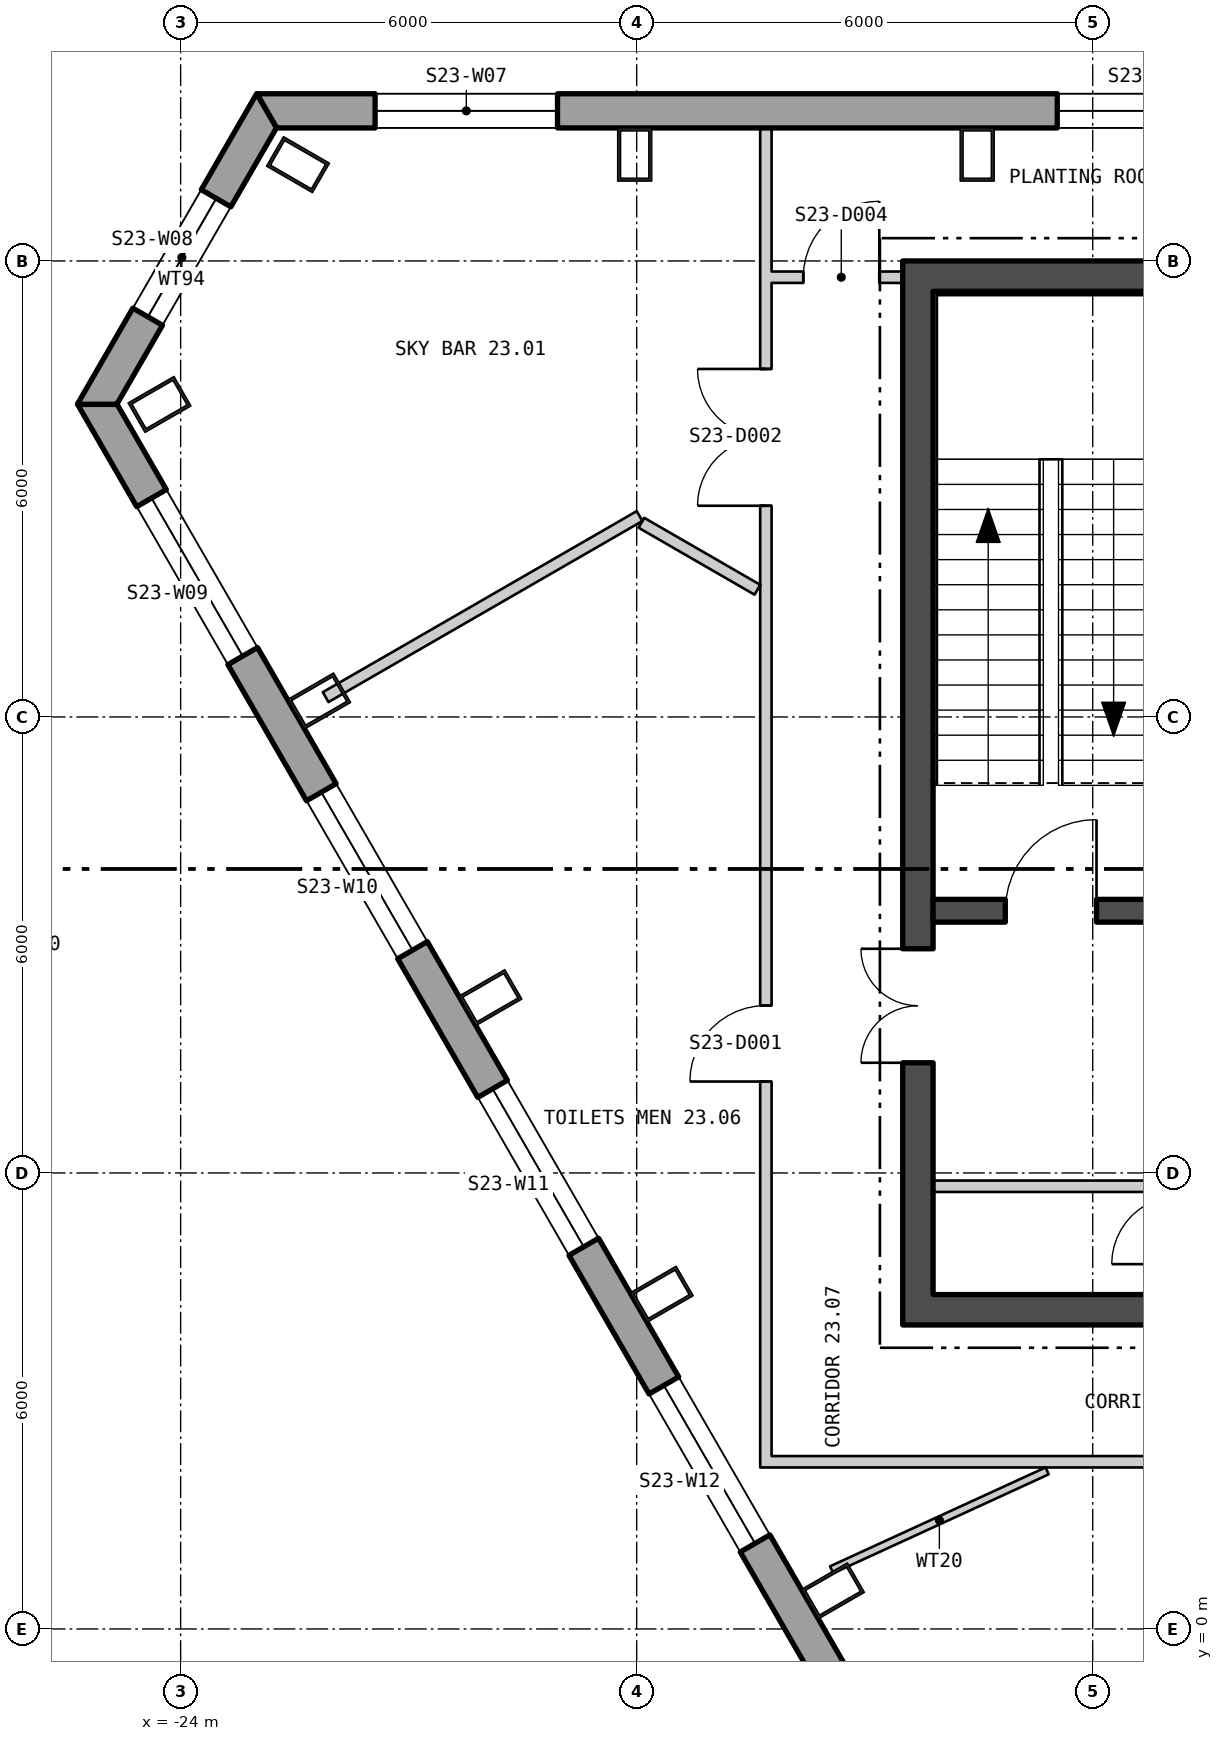
"""IFC4 building model, lengths in metres.
Left out: names, types, materials, properties, quantities, classifications, styles, units other than length and angle.
Written with IfcOpenShell. Run it as: python <this file> out.ifc"""

import sys

from ifc_helpers import new_model, si_unit, direction, frame, frame_2d, origin, origin_2d, place, context, subcontext, project, spatial, polyline, rectangle, hollow_rectangle, outline, extrude, element, fill, save


model = new_model("IFC4")
c1 = context("Model", 3, precision=1e-05, world=origin(), true_north=direction((0.0, 1.0)))
c2 = subcontext(c1, "Body", "Model", "MODEL_VIEW")
j1 = project(units=[si_unit("LENGTHUNIT", "METRE"), si_unit("PLANEANGLEUNIT", "RADIAN")], contexts=[c1])
p1 = place(None, origin())
s1 = spatial("IfcSite", under=j1, at=p1, CompositionType="ELEMENT")
p2 = place(p1, origin())
s2 = spatial("IfcBuilding", under=s1, at=p2, CompositionType="ELEMENT")
p3 = place(p2, frame((0.0, 0.0, 304.2)))
s3 = spatial("IfcBuildingStorey", under=s2, at=p3, CompositionType="ELEMENT", Elevation=304.2)
for number, where, z_axis, x_axis in (
    (1, (-13.52, 19.4, 0.0), (0.0, 0.0, 1.0), (-1.0, 0.0, 0.0)),
    (2, (-18.026, 19.4, 0.0), (0.0, 0.0, 1.0), (-1.0, 0.0, 0.0)),
    (3, (-22.456, 19.267, 0.0), (0.0, 0.0, 1.0), (-0.5, -0.866, 0.0)),
    (4, (-24.278, 16.112, 0.0), (0.0, 0.0, 1.0), (0.5, -0.866, 0.0)),
    (5, (-22.178, 12.21, 0.0), (0.0, 0.0, 1.0), (0.5, -0.866, 0.0)),
    (6, (-19.925, 8.307, 0.0), (0.0, 0.0, 1.0), (0.5, -0.866, 0.0)),
    (7, (-17.671, 4.404, 0.0), (0.0, 0.0, 1.0), (0.5, -0.866, 0.0)),
    (8, (-15.418, 0.501, 0.0), (0.0, 0.0, 1.0), (0.5, -0.866, 0.0)),
):
    element("IfcColumn", number, at=place(p3, frame(where, z_axis=z_axis, x_axis=x_axis)), inside=s3, PredefinedType="COLUMN", context=c2, shape_type="SweptSolid", body=[
        extrude(hollow_rectangle(XDim=0.45, YDim=0.7, WallThickness=0.04, at=origin_2d()), origin(), (0.0, 0.0, 1.0), 4.2),
    ])
p4 = place(p3, frame((22.865, 19.975, -0.4), z_axis=(0.0, 0.0, 1.0), x_axis=(-1.0, 0.0, 0.0)))
e9 = element("IfcWall", 9, at=p4, inside=s3, PredefinedType="SOLIDWALL", context=c2, shape_type="SweptSolid", body=[
    extrude(outline(polyline([(-0.13, -0.225), (45.86, -0.225), (45.6, 0.225), (0.13, 0.225), (-0.13, -0.225)])), origin(), (0.0, 0.0, 1.0), 4.2),
])
p5 = place(p4, frame((1.424, 0.0, 1.3)))
e10 = element("IfcOpeningElement", 10, at=p5, cuts=e9, PredefinedType="OPENING", context=c2, shape_type="SweptSolid", body=[
    extrude(rectangle(XDim=2.4, YDim=2.3, at=frame_2d((1.2, 1.15))), frame((0.0, 0.235, 0.0), z_axis=(0.0, -1.0, 0.0), x_axis=(1.0, 0.0, 0.0)), (0.0, 0.0, 1.0), 0.47),
])
p6 = place(p4, frame((14.905, 0.0, 1.3)))
e11 = element("IfcOpeningElement", 11, at=p6, cuts=e9, PredefinedType="OPENING", context=c2, shape_type="SweptSolid", body=[
    extrude(rectangle(XDim=2.4, YDim=2.3, at=frame_2d((1.2, 1.15))), frame((0.0, 0.235, 0.0), z_axis=(0.0, -1.0, 0.0), x_axis=(1.0, 0.0, 0.0)), (0.0, 0.0, 1.0), 0.47),
])
p7 = place(p4, frame((19.412, 0.0, 1.3)))
e12 = element("IfcOpeningElement", 12, at=p7, cuts=e9, PredefinedType="OPENING", context=c2, shape_type="SweptSolid", body=[
    extrude(rectangle(XDim=2.4, YDim=2.3, at=frame_2d((1.2, 1.15))), frame((0.0, 0.235, 0.0), z_axis=(0.0, -1.0, 0.0), x_axis=(1.0, 0.0, 0.0)), (0.0, 0.0, 1.0), 0.47),
])
p8 = place(p4, frame((23.918, 0.0, 1.3)))
e13 = element("IfcOpeningElement", 13, at=p8, cuts=e9, PredefinedType="OPENING", context=c2, shape_type="SweptSolid", body=[
    extrude(rectangle(XDim=2.4, YDim=2.3, at=frame_2d((1.2, 1.15))), frame((0.0, 0.235, 0.0), z_axis=(0.0, -1.0, 0.0), x_axis=(1.0, 0.0, 0.0)), (0.0, 0.0, 1.0), 0.47),
])
p9 = place(p4, frame((28.425, 0.0, 1.3)))
e14 = element("IfcOpeningElement", 14, at=p9, cuts=e9, PredefinedType="OPENING", context=c2, shape_type="SweptSolid", body=[
    extrude(rectangle(XDim=2.4, YDim=2.3, at=frame_2d((1.2, 1.15))), frame((0.0, 0.235, 0.0), z_axis=(0.0, -1.0, 0.0), x_axis=(1.0, 0.0, 0.0)), (0.0, 0.0, 1.0), 0.47),
])
p10 = place(p4, frame((32.932, 0.0, 1.3)))
e15 = element("IfcOpeningElement", 15, at=p10, cuts=e9, PredefinedType="OPENING", context=c2, shape_type="SweptSolid", body=[
    extrude(rectangle(XDim=2.4, YDim=2.3, at=frame_2d((1.2, 1.15))), frame((0.0, 0.235, 0.0), z_axis=(0.0, -1.0, 0.0), x_axis=(1.0, 0.0, 0.0)), (0.0, 0.0, 1.0), 0.47),
])
p11 = place(p4, frame((41.907, 0.0, 1.3)))
e16 = element("IfcOpeningElement", 16, at=p11, cuts=e9, PredefinedType="OPENING", context=c2, shape_type="SweptSolid", body=[
    extrude(rectangle(XDim=2.4, YDim=2.3, at=frame_2d((1.2, 1.15))), frame((0.0, 0.235, 0.0), z_axis=(0.0, -1.0, 0.0), x_axis=(1.0, 0.0, 0.0)), (0.0, 0.0, 1.0), 0.47),
])
p12 = place(p3, frame((-22.869, 19.977, -0.4), z_axis=(0.0, 0.0, 1.0), x_axis=(-0.499994806646, -0.866028402148, 0.0)))
e17 = element("IfcWall", 17, at=p12, inside=s3, PredefinedType="SOLIDWALL", context=c2, shape_type="SweptSolid", body=[
    extrude(outline(polyline([(-0.13, -0.225), (4.59, -0.225), (4.33, 0.225), (0.13, 0.225), (-0.13, -0.225)])), origin(), (0.0, 0.0, 1.0), 4.2),
])
p13 = place(p12, frame((1.33, 0.0, 1.3)))
e18 = element("IfcOpeningElement", 18, at=p13, cuts=e17, PredefinedType="OPENING", context=c2, shape_type="SweptSolid", body=[
    extrude(rectangle(XDim=1.8, YDim=2.3, at=frame_2d((0.9, 1.15))), frame((0.0, 0.235, 0.0), z_axis=(0.0, -1.0, 0.0), x_axis=(1.0, 0.0, 0.0)), (0.0, 0.0, 1.0), 0.47),
])
p14 = place(p3, frame((-25.095, 16.112, -0.18), z_axis=(0.0, 0.0, 1.0), x_axis=(0.500000141277, -0.866025322218, 0.0)))
e19 = element("IfcWall", 19, at=p14, inside=s3, PredefinedType="SOLIDWALL", context=c2, shape_type="SweptSolid", body=[
    extrude(outline(polyline([(-0.13, -0.225), (45.86, -0.225), (45.6, 0.225), (0.13, 0.225), (-0.13, -0.225)])), origin(), (0.0, 0.0, 1.0), 3.98),
])
p15 = place(p14, frame((1.424, 0.0, 1.08)))
e20 = element("IfcOpeningElement", 20, at=p15, cuts=e19, PredefinedType="OPENING", context=c2, shape_type="SweptSolid", body=[
    extrude(rectangle(XDim=2.4, YDim=2.3, at=frame_2d((1.2, 1.15))), frame((0.0, 0.235, 0.0), z_axis=(0.0, -1.0, 0.0), x_axis=(1.0, 0.0, 0.0)), (0.0, 0.0, 1.0), 0.47),
])
p16 = place(p14, frame((5.892, 0.0, 1.08)))
e21 = element("IfcOpeningElement", 21, at=p16, cuts=e19, PredefinedType="OPENING", context=c2, shape_type="SweptSolid", body=[
    extrude(rectangle(XDim=2.4, YDim=2.3, at=frame_2d((1.2, 1.15))), frame((0.0, 0.235, 0.0), z_axis=(0.0, -1.0, 0.0), x_axis=(1.0, 0.0, 0.0)), (0.0, 0.0, 1.0), 0.47),
])
p17 = place(p14, frame((10.399, 0.0, 1.08)))
e22 = element("IfcOpeningElement", 22, at=p17, cuts=e19, PredefinedType="OPENING", context=c2, shape_type="SweptSolid", body=[
    extrude(rectangle(XDim=2.4, YDim=2.3, at=frame_2d((1.2, 1.15))), frame((0.0, 0.235, 0.0), z_axis=(0.0, -1.0, 0.0), x_axis=(1.0, 0.0, 0.0)), (0.0, 0.0, 1.0), 0.47),
])
p18 = place(p14, frame((14.905, 0.0, 1.08)))
e23 = element("IfcOpeningElement", 23, at=p18, cuts=e19, PredefinedType="OPENING", context=c2, shape_type="SweptSolid", body=[
    extrude(rectangle(XDim=2.4, YDim=2.3, at=frame_2d((1.2, 1.15))), frame((0.0, 0.235, 0.0), z_axis=(0.0, -1.0, 0.0), x_axis=(1.0, 0.0, 0.0)), (0.0, 0.0, 1.0), 0.47),
])
p19 = place(p14, frame((19.412, 0.0, 1.08)))
e24 = element("IfcOpeningElement", 24, at=p19, cuts=e19, PredefinedType="OPENING", context=c2, shape_type="SweptSolid", body=[
    extrude(rectangle(XDim=2.4, YDim=2.3, at=frame_2d((1.2, 1.15))), frame((0.0, 0.235, 0.0), z_axis=(0.0, -1.0, 0.0), x_axis=(1.0, 0.0, 0.0)), (0.0, 0.0, 1.0), 0.47),
])
p20 = place(p14, frame((28.425, 0.0, 1.08)))
e25 = element("IfcOpeningElement", 25, at=p20, cuts=e19, PredefinedType="OPENING", context=c2, shape_type="SweptSolid", body=[
    extrude(rectangle(XDim=2.4, YDim=2.3, at=frame_2d((1.2, 1.15))), frame((0.0, 0.235, 0.0), z_axis=(0.0, -1.0, 0.0), x_axis=(1.0, 0.0, 0.0)), (0.0, 0.0, 1.0), 0.47),
])
p21 = place(p14, frame((32.932, 0.0, 1.08)))
e26 = element("IfcOpeningElement", 26, at=p21, cuts=e19, PredefinedType="OPENING", context=c2, shape_type="SweptSolid", body=[
    extrude(rectangle(XDim=2.4, YDim=2.3, at=frame_2d((1.2, 1.15))), frame((0.0, 0.235, 0.0), z_axis=(0.0, -1.0, 0.0), x_axis=(1.0, 0.0, 0.0)), (0.0, 0.0, 1.0), 0.47),
])
p22 = place(p14, frame((37.438, 0.0, 1.08)))
e27 = element("IfcOpeningElement", 27, at=p22, cuts=e19, PredefinedType="OPENING", context=c2, shape_type="SweptSolid", body=[
    extrude(rectangle(XDim=2.4, YDim=2.3, at=frame_2d((1.2, 1.15))), frame((0.0, 0.235, 0.0), z_axis=(0.0, -1.0, 0.0), x_axis=(1.0, 0.0, 0.0)), (0.0, 0.0, 1.0), 0.47),
])
p23 = place(p14, frame((41.907, 0.0, 1.08)))
e28 = element("IfcOpeningElement", 28, at=p23, cuts=e19, PredefinedType="OPENING", context=c2, shape_type="SweptSolid", body=[
    extrude(rectangle(XDim=2.4, YDim=2.3, at=frame_2d((1.2, 1.15))), frame((0.0, 0.235, 0.0), z_axis=(0.0, -1.0, 0.0), x_axis=(1.0, 0.0, 0.0)), (0.0, 0.0, 1.0), 0.47),
])
p24 = place(p3, frame((-14.5, 4.2, 0.0), z_axis=(0.0, 0.0, 1.0), x_axis=(1.0, 0.0, 0.0)))
e29 = element("IfcWall", 29, at=p24, inside=s3, PredefinedType="SHEAR", context=c2, shape_type="SweptSolid", body=[
    extrude(rectangle(XDim=29.0, YDim=0.4, at=frame_2d((14.5, 0.0))), origin(), (0.0, 0.0, 1.0), 4.0),
])
p25 = place(p24, frame((9.0, 0.0, 0.0)))
e30 = element("IfcOpeningElement", 30, at=p25, cuts=e29, PredefinedType="OPENING", context=c2, shape_type="SweptSolid", body=[
    extrude(rectangle(XDim=1.8, YDim=2.4, at=frame_2d((0.9, 1.2))), frame((0.0, 0.21, 0.0), z_axis=(0.0, -1.0, 0.0), x_axis=(1.0, 0.0, 0.0)), (0.0, 0.0, 1.0), 0.42),
])
p26 = place(p24, frame((19.0, 0.0, 0.0)))
e31 = element("IfcOpeningElement", 31, at=p26, cuts=e29, PredefinedType="OPENING", context=c2, shape_type="SweptSolid", body=[
    extrude(rectangle(XDim=1.8, YDim=2.4, at=frame_2d((0.9, 1.2))), frame((0.0, 0.21, 0.0), z_axis=(0.0, -1.0, 0.0), x_axis=(1.0, 0.0, 0.0)), (0.0, 0.0, 1.0), 0.42),
])
p27 = place(p3, frame((-14.5, 17.8, 0.0), z_axis=(0.0, 0.0, 1.0), x_axis=(1.0, 0.0, 0.0)))
e32 = element("IfcWall", 32, at=p27, inside=s3, PredefinedType="SHEAR", context=c2, shape_type="SweptSolid", body=[
    extrude(rectangle(XDim=29.0, YDim=0.4, at=frame_2d((14.5, 0.0))), origin(), (0.0, 0.0, 1.0), 4.0),
])
p28 = place(p3, frame((-14.3, 4.4, 0.0), z_axis=(0.0, 0.0, 1.0), x_axis=(0.0, 1.0, 0.0)))
e33 = element("IfcWall", 33, at=p28, inside=s3, PredefinedType="SHEAR", context=c2, shape_type="SweptSolid", body=[
    extrude(rectangle(XDim=13.2, YDim=0.4, at=frame_2d((6.6, 0.0))), origin(), (0.0, 0.0, 1.0), 4.0),
])
p29 = place(p28, frame((3.05, 0.0, 0.0)))
e34 = element("IfcOpeningElement", 34, at=p29, cuts=e33, PredefinedType="OPENING", context=c2, shape_type="SweptSolid", body=[
    extrude(rectangle(XDim=1.5, YDim=2.1, at=frame_2d((0.75, 1.05))), frame((0.0, 0.21, 0.0), z_axis=(0.0, -1.0, 0.0), x_axis=(1.0, 0.0, 0.0)), (0.0, 0.0, 1.0), 0.42),
])
p30 = place(p3, frame((-14.1, 9.45, 0.0), z_axis=(0.0, 0.0, 1.0), x_axis=(1.0, 0.0, 0.0)))
e35 = element("IfcWall", 35, at=p30, inside=s3, PredefinedType="SHEAR", context=c2, shape_type="SweptSolid", body=[
    extrude(rectangle(XDim=3.1, YDim=0.3, at=frame_2d((1.55, 0.0))), origin(), (0.0, 0.0, 1.0), 4.0),
])
p31 = place(p30, frame((0.95, 0.0, 0.0)))
e36 = element("IfcOpeningElement", 36, at=p31, cuts=e35, PredefinedType="OPENING", context=c2, shape_type="SweptSolid", body=[
    extrude(rectangle(XDim=1.2, YDim=2.1, at=frame_2d((0.6, 1.05))), frame((0.0, 0.16, 0.0), z_axis=(0.0, -1.0, 0.0), x_axis=(1.0, 0.0, 0.0)), (0.0, 0.0, 1.0), 0.32),
])
p32 = place(p3, frame((-14.1, 5.825, 0.0), z_axis=(0.0, 0.0, 1.0), x_axis=(1.0, 0.0, 0.0)))
e37 = element("IfcWall", 37, at=p32, inside=s3, PredefinedType="PARTITIONING", context=c2, shape_type="SweptSolid", body=[
    extrude(rectangle(XDim=3.1, YDim=0.15, at=frame_2d((1.55, 0.0))), origin(), (0.0, 0.0, 1.0), 4.0),
])
p33 = place(p3, frame((-22.092, 12.261, 0.0), z_axis=(0.0, 0.0, 1.0), x_axis=(0.866248432975, 0.499613502989, 0.0)))
e38 = element("IfcWall", 38, at=p33, inside=s3, PredefinedType="PARTITIONING", context=c2, shape_type="SweptSolid", body=[
    extrude(rectangle(XDim=4.768, YDim=0.15, at=frame_2d((2.384, 0.0))), origin(), (0.0, 0.0, 1.0), 4.0),
])
p34 = place(p3, frame((-17.938, 14.555, 0.0), z_axis=(0.0, 0.0, 1.0), x_axis=(0.866034375916, -0.49998445949, 0.0)))
e39 = element("IfcWall", 39, at=p34, inside=s3, PredefinedType="PARTITIONING", context=c2, shape_type="SweptSolid", body=[
    extrude(rectangle(XDim=1.762, YDim=0.15, at=frame_2d((0.881, 0.0))), origin(), (0.0, 0.0, 1.0), 4.0),
])
p35 = place(p3, frame((-16.3, 2.125, 0.0), z_axis=(0.0, 0.0, 1.0), x_axis=(0.0, 1.0, 0.0)))
e40 = element("IfcWall", 40, at=p35, inside=s3, PredefinedType="PARTITIONING", context=c2, shape_type="SweptSolid", body=[
    extrude(rectangle(XDim=17.623, YDim=0.15, at=frame_2d((8.812, 0.0))), origin(), (0.0, 0.0, 1.0), 4.0),
])
p36 = place(p35, frame((5.078, 0.0, 0.0)))
e41 = element("IfcOpeningElement", 41, at=p36, cuts=e40, PredefinedType="OPENING", context=c2, shape_type="SweptSolid", body=[
    extrude(rectangle(XDim=1.0, YDim=2.1, at=frame_2d((0.5, 1.05))), frame((0.0, 0.085, 0.0), z_axis=(0.0, -1.0, 0.0), x_axis=(1.0, 0.0, 0.0)), (0.0, 0.0, 1.0), 0.17),
])
p37 = place(p35, frame((12.654, 0.0, 0.0)))
e42 = element("IfcOpeningElement", 42, at=p37, cuts=e40, PredefinedType="OPENING", context=c2, shape_type="SweptSolid", body=[
    extrude(rectangle(XDim=1.8, YDim=2.1, at=frame_2d((0.9, 1.05))), frame((0.0, 0.085, 0.0), z_axis=(0.0, -1.0, 0.0), x_axis=(1.0, 0.0, 0.0)), (0.0, 0.0, 1.0), 0.17),
])
p38 = place(p3, frame((-16.225, 2.2, 0.0), z_axis=(0.0, 0.0, 1.0), x_axis=(1.0, 0.0, 0.0)))
e43 = element("IfcWall", 43, at=p38, inside=s3, PredefinedType="PARTITIONING", context=c2, shape_type="SweptSolid", body=[
    extrude(rectangle(XDim=8.645, YDim=0.15, at=frame_2d((4.322, 0.0))), origin(), (0.0, 0.0, 1.0), 4.0),
])
p39 = place(p38, frame((5.714, 0.0, 0.0)))
e44 = element("IfcOpeningElement", 44, at=p39, cuts=e43, PredefinedType="OPENING", context=c2, shape_type="SweptSolid", body=[
    extrude(rectangle(XDim=1.0, YDim=2.1, at=frame_2d((0.5, 1.05))), frame((0.0, 0.085, 0.0), z_axis=(0.0, -1.0, 0.0), x_axis=(1.0, 0.0, 0.0)), (0.0, 0.0, 1.0), 0.17),
])
p40 = place(p3, frame((-16.225, 17.786, 0.0), z_axis=(0.0, 0.0, 1.0), x_axis=(1.0, 0.0, 0.0)))
e45 = element("IfcWall", 45, at=p40, inside=s3, PredefinedType="PARTITIONING", context=c2, shape_type="SweptSolid", body=[
    extrude(rectangle(XDim=1.725, YDim=0.15, at=frame_2d((0.863, 0.0))), origin(), (0.0, 0.0, 1.0), 4.0),
])
p41 = place(p40, frame((0.417, 0.0, 0.0)))
e46 = element("IfcOpeningElement", 46, at=p41, cuts=e45, PredefinedType="OPENING", context=c2, shape_type="SweptSolid", body=[
    extrude(rectangle(XDim=1.0, YDim=2.1, at=frame_2d((0.5, 1.05))), frame((0.0, 0.085, 0.0), z_axis=(0.0, -1.0, 0.0), x_axis=(1.0, 0.0, 0.0)), (0.0, 0.0, 1.0), 0.17),
])
p42 = place(p3, frame((-15.435, 0.779, 0.0), z_axis=(0.0, 0.0, 1.0), x_axis=(0.908867400556, 0.417085180996, 0.0)))
e47 = element("IfcWall", 47, at=p42, inside=s3, PredefinedType="PARTITIONING", context=c2, shape_type="SweptSolid", body=[
    extrude(rectangle(XDim=3.119, YDim=0.1, at=frame_2d((1.56, 0.0))), origin(), (0.0, 0.0, 1.0), 4.0),
])
p43 = place(p10, origin())
e48 = element("IfcWindow", 48, at=p43, inside=s3, PartitioningType="SINGLE_PANEL", PredefinedType="WINDOW", context=c2, shape_type="SweptSolid", body=[
    extrude(rectangle(XDim=2.4, YDim=2.3, at=frame_2d((1.2, 1.15))), frame((0.0, 0.105, 0.0), z_axis=(0.0, -1.0, 0.0), x_axis=(1.0, 0.0, 0.0)), (0.0, 0.0, 1.0), 0.06),
])
fill(e15, e48)
p44 = place(p11, origin())
e49 = element("IfcWindow", 49, at=p44, inside=s3, PartitioningType="SINGLE_PANEL", PredefinedType="WINDOW", context=c2, shape_type="SweptSolid", body=[
    extrude(rectangle(XDim=2.4, YDim=2.3, at=frame_2d((1.2, 1.15))), frame((0.0, 0.105, 0.0), z_axis=(0.0, -1.0, 0.0), x_axis=(1.0, 0.0, 0.0)), (0.0, 0.0, 1.0), 0.06),
])
fill(e16, e49)
p45 = place(p13, origin())
e50 = element("IfcWindow", 50, at=p45, inside=s3, PartitioningType="SINGLE_PANEL", PredefinedType="WINDOW", context=c2, shape_type="SweptSolid", body=[
    extrude(rectangle(XDim=1.8, YDim=2.3, at=frame_2d((0.9, 1.15))), frame((0.0, 0.105, 0.0), z_axis=(0.0, -1.0, 0.0), x_axis=(1.0, 0.0, 0.0)), (0.0, 0.0, 1.0), 0.06),
])
fill(e18, e50)
p46 = place(p15, origin())
e51 = element("IfcWindow", 51, at=p46, inside=s3, PartitioningType="SINGLE_PANEL", PredefinedType="WINDOW", context=c2, shape_type="SweptSolid", body=[
    extrude(rectangle(XDim=2.4, YDim=2.3, at=frame_2d((1.2, 1.15))), frame((0.0, 0.105, 0.0), z_axis=(0.0, -1.0, 0.0), x_axis=(1.0, 0.0, 0.0)), (0.0, 0.0, 1.0), 0.06),
])
fill(e20, e51)
p47 = place(p16, origin())
e52 = element("IfcWindow", 52, at=p47, inside=s3, PartitioningType="SINGLE_PANEL", PredefinedType="WINDOW", context=c2, shape_type="SweptSolid", body=[
    extrude(rectangle(XDim=2.4, YDim=2.3, at=frame_2d((1.2, 1.15))), frame((0.0, 0.105, 0.0), z_axis=(0.0, -1.0, 0.0), x_axis=(1.0, 0.0, 0.0)), (0.0, 0.0, 1.0), 0.06),
])
fill(e21, e52)
p48 = place(p17, origin())
e53 = element("IfcWindow", 53, at=p48, inside=s3, PartitioningType="SINGLE_PANEL", PredefinedType="WINDOW", context=c2, shape_type="SweptSolid", body=[
    extrude(rectangle(XDim=2.4, YDim=2.3, at=frame_2d((1.2, 1.15))), frame((0.0, 0.105, 0.0), z_axis=(0.0, -1.0, 0.0), x_axis=(1.0, 0.0, 0.0)), (0.0, 0.0, 1.0), 0.06),
])
fill(e22, e53)
p49 = place(p18, origin())
e54 = element("IfcWindow", 54, at=p49, inside=s3, PartitioningType="SINGLE_PANEL", PredefinedType="WINDOW", context=c2, shape_type="SweptSolid", body=[
    extrude(rectangle(XDim=2.4, YDim=2.3, at=frame_2d((1.2, 1.15))), frame((0.0, 0.105, 0.0), z_axis=(0.0, -1.0, 0.0), x_axis=(1.0, 0.0, 0.0)), (0.0, 0.0, 1.0), 0.06),
])
fill(e23, e54)
p50 = place(p31, origin())
e55 = element("IfcDoor", 55, at=p50, inside=s3, OperationType="SINGLE_SWING_LEFT", PredefinedType="DOOR", context=c2, shape_type="SweptSolid", body=[
    extrude(rectangle(XDim=1.2, YDim=2.1, at=frame_2d((0.6, 1.05))), frame((0.0, 0.025, 0.0), z_axis=(0.0, -1.0, 0.0), x_axis=(1.0, 0.0, 0.0)), (0.0, 0.0, 1.0), 0.05),
])
fill(e36, e55)
p51 = place(p29, origin())
e56 = element("IfcDoor", 56, at=p51, inside=s3, OperationType="DOUBLE_DOOR_SINGLE_SWING", PredefinedType="DOOR", context=c2, shape_type="SweptSolid", body=[
    extrude(rectangle(XDim=1.5, YDim=2.1, at=frame_2d((0.75, 1.05))), frame((0.0, 0.025, 0.0), z_axis=(0.0, -1.0, 0.0), x_axis=(1.0, 0.0, 0.0)), (0.0, 0.0, 1.0), 0.05),
])
fill(e34, e56)
p52 = place(p36, origin())
e57 = element("IfcDoor", 57, at=p52, inside=s3, OperationType="SINGLE_SWING_RIGHT", PredefinedType="DOOR", context=c2, shape_type="SweptSolid", body=[
    extrude(rectangle(XDim=1.0, YDim=2.1, at=frame_2d((0.5, 1.05))), frame((0.0, 0.025, 0.0), z_axis=(0.0, -1.0, 0.0), x_axis=(1.0, 0.0, 0.0)), (0.0, 0.0, 1.0), 0.05),
])
fill(e41, e57)
p53 = place(p37, origin())
e58 = element("IfcDoor", 58, at=p53, inside=s3, OperationType="DOUBLE_DOOR_SINGLE_SWING", PredefinedType="DOOR", context=c2, shape_type="SweptSolid", body=[
    extrude(rectangle(XDim=1.8, YDim=2.1, at=frame_2d((0.9, 1.05))), frame((0.0, 0.025, 0.0), z_axis=(0.0, -1.0, 0.0), x_axis=(1.0, 0.0, 0.0)), (0.0, 0.0, 1.0), 0.05),
])
fill(e42, e58)
p54 = place(p41, origin())
e59 = element("IfcDoor", 59, at=p54, inside=s3, OperationType="SINGLE_SWING_LEFT", PredefinedType="DOOR", context=c2, shape_type="SweptSolid", body=[
    extrude(rectangle(XDim=1.0, YDim=2.1, at=frame_2d((0.5, 1.05))), frame((0.0, 0.025, 0.0), z_axis=(0.0, -1.0, 0.0), x_axis=(1.0, 0.0, 0.0)), (0.0, 0.0, 1.0), 0.05),
])
fill(e46, e59)
save(model, sys.argv[1])
